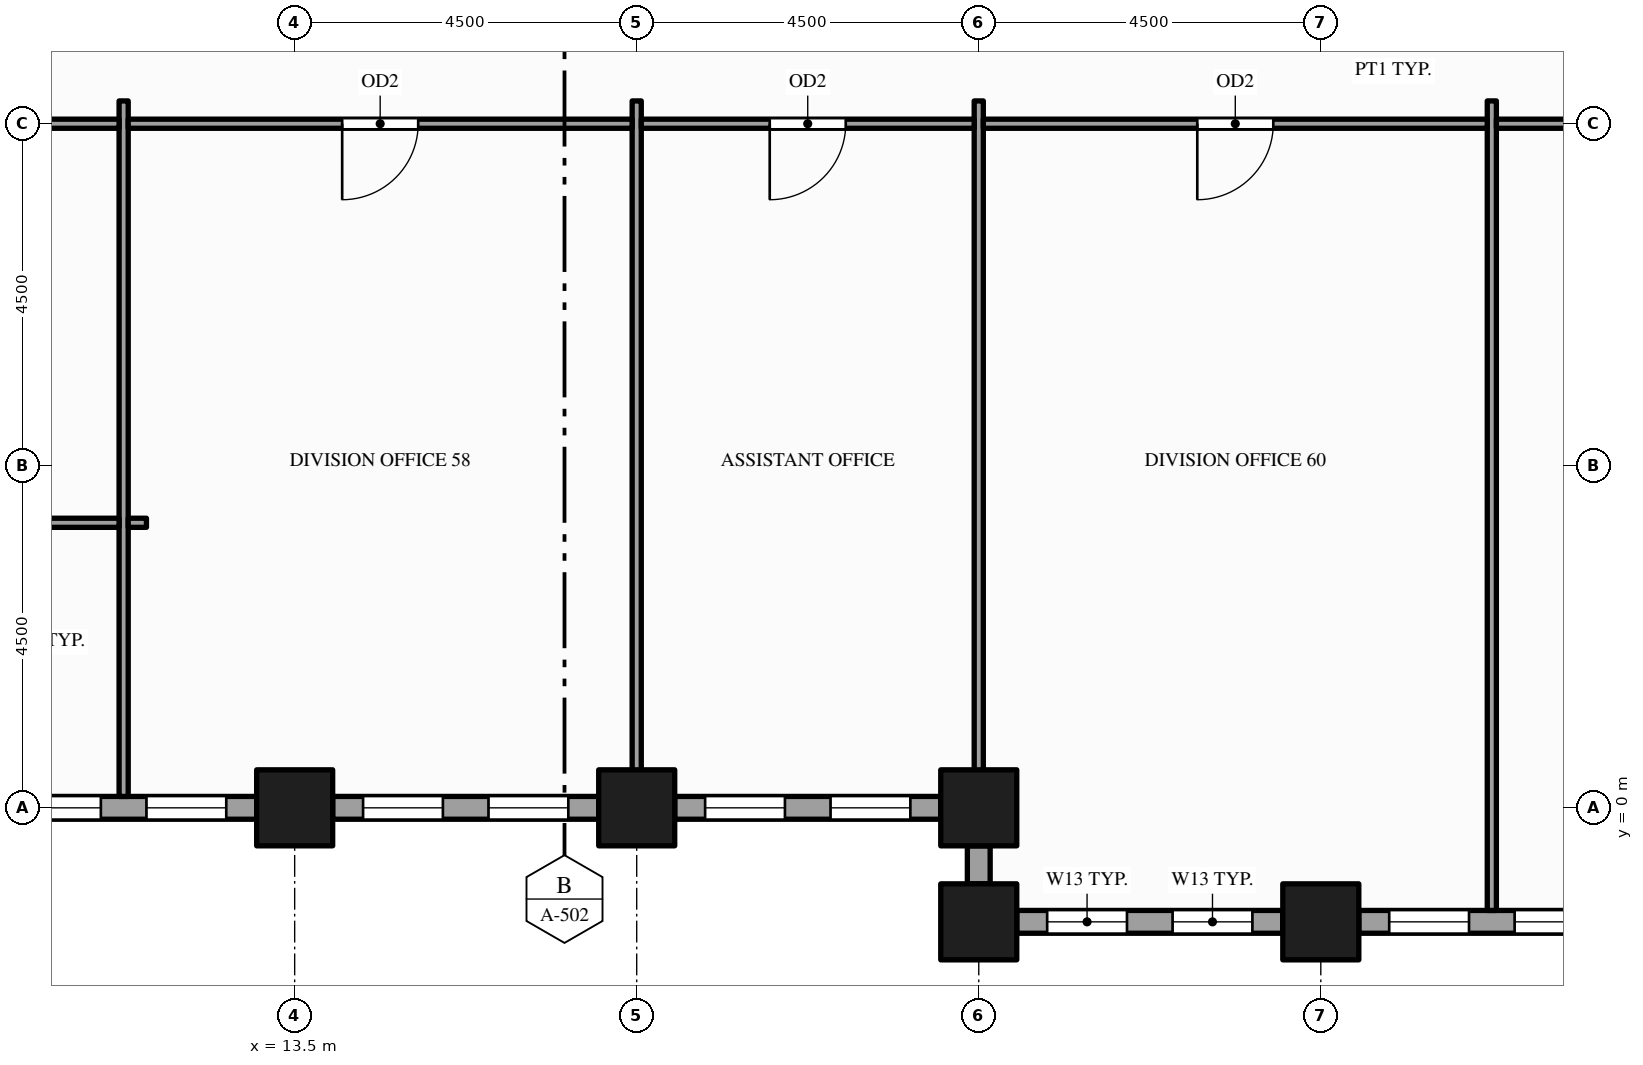
"""IFC4 building model, lengths in metres.
Left out: names, types, materials, properties, quantities, classifications, styles, units other than length and angle.
Written with IfcOpenShell. Run it as: python <this file> out.ifc"""

import sys

from ifc_helpers import new_model, si_unit, direction, frame, frame_2d, origin, origin_2d, place, context, subcontext, project, spatial, rectangle, hollow_rectangle, extrude, element, fill, save


model = new_model("IFC4")
c1 = context("Model", 3, precision=1e-05, world=origin(), true_north=direction((0.0, 1.0)))
c2 = subcontext(c1, "Body", "Model", "MODEL_VIEW")
j1 = project(units=[si_unit("LENGTHUNIT", "METRE"), si_unit("PLANEANGLEUNIT", "RADIAN")], contexts=[c1])
p1 = place(None, origin())
s1 = spatial("IfcSite", under=j1, at=p1, CompositionType="ELEMENT")
p2 = place(p1, origin())
s2 = spatial("IfcBuilding", under=s1, at=p2, CompositionType="ELEMENT")
p3 = place(p2, frame((0.0, 0.0, 95.0)))
s3 = spatial("IfcBuildingStorey", under=s2, at=p3, CompositionType="ELEMENT", Elevation=95.0)
for number, where, z_axis, x_axis in (
    (1, (13.5, 0.0, -0.15), (0.0, 0.0, 1.0), (1.0, 0.0, 0.0)),
    (2, (18.0, 0.0, -0.15), (0.0, 0.0, 1.0), (1.0, 0.0, 0.0)),
    (3, (22.5, -1.5, -0.15), (0.0, 0.0, 1.0), (1.0, 0.0, 0.0)),
    (4, (22.5, 0.0, -0.15), (0.0, 0.0, 1.0), (1.0, 0.0, 0.0)),
    (5, (27.0, -1.5, -0.15), (0.0, 0.0, 1.0), (1.0, 0.0, 0.0)),
):
    element("IfcColumn", number, at=place(p3, frame(where, z_axis=z_axis, x_axis=x_axis)), inside=s3, PredefinedType="COLUMN", context=c2, shape_type="SweptSolid", body=[
        extrude(hollow_rectangle(XDim=1.0, YDim=1.0, WallThickness=0.05, at=origin_2d()), origin(), (0.0, 0.0, 1.0), 4.0),
    ])
p4 = place(p3, frame((23.0, -1.5, 0.0), z_axis=(0.0, 0.0, 1.0), x_axis=(1.0, 0.0, 0.0)))
e6 = element("IfcWall", 6, at=p4, inside=s3, PredefinedType="STANDARD", context=c2, shape_type="SweptSolid", body=[
    extrude(rectangle(XDim=3.5, YDim=0.3, at=frame_2d((1.75, 0.0))), origin(), (0.0, 0.0, 1.0), 3.154),
])
p5 = place(p4, frame((0.4, 0.0, 0.9)))
e7 = element("IfcOpeningElement", 7, at=p5, cuts=e6, PredefinedType="OPENING", context=c2, shape_type="SweptSolid", body=[
    extrude(rectangle(XDim=1.05, YDim=2.0, at=frame_2d((0.525, 1.0))), frame((0.0, 0.16, 0.0), z_axis=(0.0, -1.0, 0.0), x_axis=(1.0, 0.0, 0.0)), (0.0, 0.0, 1.0), 0.32),
])
p6 = place(p4, frame((2.05, 0.0, 0.9)))
e8 = element("IfcOpeningElement", 8, at=p6, cuts=e6, PredefinedType="OPENING", context=c2, shape_type="SweptSolid", body=[
    extrude(rectangle(XDim=1.05, YDim=2.0, at=frame_2d((0.525, 1.0))), frame((0.0, 0.16, 0.0), z_axis=(0.0, -1.0, 0.0), x_axis=(1.0, 0.0, 0.0)), (0.0, 0.0, 1.0), 0.32),
])
p7 = place(p3, frame((27.5, -1.5, 0.0), z_axis=(0.0, 0.0, 1.0), x_axis=(1.0, 0.0, 0.0)))
e9 = element("IfcWall", 9, at=p7, inside=s3, PredefinedType="STANDARD", context=c2, shape_type="SweptSolid", body=[
    extrude(rectangle(XDim=3.5, YDim=0.3, at=frame_2d((1.75, 0.0))), origin(), (0.0, 0.0, 1.0), 3.154),
])
p8 = place(p7, frame((0.4, 0.0, 0.9)))
e10 = element("IfcOpeningElement", 10, at=p8, cuts=e9, PredefinedType="OPENING", context=c2, shape_type="SweptSolid", body=[
    extrude(rectangle(XDim=1.05, YDim=2.0, at=frame_2d((0.525, 1.0))), frame((0.0, 0.16, 0.0), z_axis=(0.0, -1.0, 0.0), x_axis=(1.0, 0.0, 0.0)), (0.0, 0.0, 1.0), 0.32),
])
p9 = place(p7, frame((2.05, 0.0, 0.9)))
e11 = element("IfcOpeningElement", 11, at=p9, cuts=e9, PredefinedType="OPENING", context=c2, shape_type="SweptSolid", body=[
    extrude(rectangle(XDim=1.05, YDim=2.0, at=frame_2d((0.525, 1.0))), frame((0.0, 0.16, 0.0), z_axis=(0.0, -1.0, 0.0), x_axis=(1.0, 0.0, 0.0)), (0.0, 0.0, 1.0), 0.32),
])
p10 = place(p3, frame((9.5, 0.0, 0.0), z_axis=(0.0, 0.0, 1.0), x_axis=(1.0, 0.0, 0.0)))
e12 = element("IfcWall", 12, at=p10, inside=s3, PredefinedType="STANDARD", context=c2, shape_type="SweptSolid", body=[
    extrude(rectangle(XDim=3.5, YDim=0.3, at=frame_2d((1.75, 0.0))), origin(), (0.0, 0.0, 1.0), 3.154),
])
p11 = place(p10, frame((0.4, 0.0, 0.9)))
e13 = element("IfcOpeningElement", 13, at=p11, cuts=e12, PredefinedType="OPENING", context=c2, shape_type="SweptSolid", body=[
    extrude(rectangle(XDim=1.05, YDim=2.0, at=frame_2d((0.525, 1.0))), frame((0.0, 0.16, 0.0), z_axis=(0.0, -1.0, 0.0), x_axis=(1.0, 0.0, 0.0)), (0.0, 0.0, 1.0), 0.32),
])
p12 = place(p10, frame((2.05, 0.0, 0.9)))
e14 = element("IfcOpeningElement", 14, at=p12, cuts=e12, PredefinedType="OPENING", context=c2, shape_type="SweptSolid", body=[
    extrude(rectangle(XDim=1.05, YDim=2.0, at=frame_2d((0.525, 1.0))), frame((0.0, 0.16, 0.0), z_axis=(0.0, -1.0, 0.0), x_axis=(1.0, 0.0, 0.0)), (0.0, 0.0, 1.0), 0.32),
])
p13 = place(p3, frame((14.0, 0.0, 0.0), z_axis=(0.0, 0.0, 1.0), x_axis=(1.0, 0.0, 0.0)))
e15 = element("IfcWall", 15, at=p13, inside=s3, PredefinedType="STANDARD", context=c2, shape_type="SweptSolid", body=[
    extrude(rectangle(XDim=3.5, YDim=0.3, at=frame_2d((1.75, 0.0))), origin(), (0.0, 0.0, 1.0), 3.154),
])
p14 = place(p13, frame((0.4, 0.0, 0.9)))
e16 = element("IfcOpeningElement", 16, at=p14, cuts=e15, PredefinedType="OPENING", context=c2, shape_type="SweptSolid", body=[
    extrude(rectangle(XDim=1.05, YDim=2.0, at=frame_2d((0.525, 1.0))), frame((0.0, 0.16, 0.0), z_axis=(0.0, -1.0, 0.0), x_axis=(1.0, 0.0, 0.0)), (0.0, 0.0, 1.0), 0.32),
])
p15 = place(p13, frame((2.05, 0.0, 0.9)))
e17 = element("IfcOpeningElement", 17, at=p15, cuts=e15, PredefinedType="OPENING", context=c2, shape_type="SweptSolid", body=[
    extrude(rectangle(XDim=1.05, YDim=2.0, at=frame_2d((0.525, 1.0))), frame((0.0, 0.16, 0.0), z_axis=(0.0, -1.0, 0.0), x_axis=(1.0, 0.0, 0.0)), (0.0, 0.0, 1.0), 0.32),
])
p16 = place(p3, frame((18.5, 0.0, 0.0), z_axis=(0.0, 0.0, 1.0), x_axis=(1.0, 0.0, 0.0)))
e18 = element("IfcWall", 18, at=p16, inside=s3, PredefinedType="STANDARD", context=c2, shape_type="SweptSolid", body=[
    extrude(rectangle(XDim=3.5, YDim=0.3, at=frame_2d((1.75, 0.0))), origin(), (0.0, 0.0, 1.0), 3.154),
])
p17 = place(p16, frame((0.4, 0.0, 0.9)))
e19 = element("IfcOpeningElement", 19, at=p17, cuts=e18, PredefinedType="OPENING", context=c2, shape_type="SweptSolid", body=[
    extrude(rectangle(XDim=1.05, YDim=2.0, at=frame_2d((0.525, 1.0))), frame((0.0, 0.16, 0.0), z_axis=(0.0, -1.0, 0.0), x_axis=(1.0, 0.0, 0.0)), (0.0, 0.0, 1.0), 0.32),
])
p18 = place(p16, frame((2.05, 0.0, 0.9)))
e20 = element("IfcOpeningElement", 20, at=p18, cuts=e18, PredefinedType="OPENING", context=c2, shape_type="SweptSolid", body=[
    extrude(rectangle(XDim=1.05, YDim=2.0, at=frame_2d((0.525, 1.0))), frame((0.0, 0.16, 0.0), z_axis=(0.0, -1.0, 0.0), x_axis=(1.0, 0.0, 0.0)), (0.0, 0.0, 1.0), 0.32),
])
p19 = place(p3, frame((22.5, -0.5, 0.0), z_axis=(0.0, 0.0, 1.0), x_axis=(0.0, -1.0, 0.0)))
e21 = element("IfcWall", 21, at=p19, inside=s3, PredefinedType="STANDARD", context=c2, shape_type="SweptSolid", body=[
    extrude(rectangle(XDim=0.5, YDim=0.3, at=frame_2d((0.25, 0.0))), origin(), (0.0, 0.0, 1.0), 3.154),
])
for number, where, z_axis, x_axis in (
    (22, (11.25, 0.15, 0.0), (0.0, 0.0, 1.0), (0.0, 1.0, 0.0)),
    (23, (18.0, 0.15, 0.0), (0.0, 0.0, 1.0), (0.0, 1.0, 0.0)),
    (24, (22.5, 0.15, 0.0), (0.0, 0.0, 1.0), (0.0, 1.0, 0.0)),
):
    element("IfcWall", number, at=place(p3, frame(where, z_axis=z_axis, x_axis=x_axis)), inside=s3, PredefinedType="PARTITIONING", context=c2, shape_type="SweptSolid", body=[
        extrude(rectangle(XDim=9.15, YDim=0.12, at=frame_2d((4.575, 0.0))), origin(), (0.0, 0.0, 1.0), 2.938),
    ])
p20 = place(p3, frame((29.25, -1.35, 0.0), z_axis=(0.0, 0.0, 1.0), x_axis=(0.0, 1.0, 0.0)))
e25 = element("IfcWall", 25, at=p20, inside=s3, PredefinedType="PARTITIONING", context=c2, shape_type="SweptSolid", body=[
    extrude(rectangle(XDim=10.65, YDim=0.12, at=frame_2d((5.325, 0.0))), origin(), (0.0, 0.0, 1.0), 2.938),
])
p21 = place(p3, frame((9.125, 3.75, 0.0), z_axis=(0.0, 0.0, 1.0), x_axis=(1.0, 0.0, 0.0)))
e26 = element("IfcWall", 26, at=p21, inside=s3, PredefinedType="PARTITIONING", context=c2, shape_type="SweptSolid", body=[
    extrude(rectangle(XDim=2.065, YDim=0.12, at=frame_2d((1.032, 0.0))), origin(), (0.0, 0.0, 1.0), 2.938),
])
p22 = place(p3, frame((11.31, 3.75, 0.0), z_axis=(0.0, 0.0, 1.0), x_axis=(1.0, 0.0, 0.0)))
e27 = element("IfcWall", 27, at=p22, inside=s3, PredefinedType="PARTITIONING", context=c2, shape_type="SweptSolid", body=[
    extrude(rectangle(XDim=0.24, YDim=0.12, at=frame_2d((0.12, 0.0))), origin(), (0.0, 0.0, 1.0), 2.938),
])
p23 = place(p3, frame((0.15, 9.0, 0.0), z_axis=(0.0, 0.0, 1.0), x_axis=(1.0, 0.0, 0.0)))
e28 = element("IfcWall", 28, at=p23, inside=s3, PredefinedType="PARTITIONING", context=c2, shape_type="SweptSolid", body=[
    extrude(rectangle(XDim=11.04, YDim=0.12, at=frame_2d((5.52, 0.0))), origin(), (0.0, 0.0, 1.0), 2.938),
])
p24 = place(p23, frame((4.93, 0.0, 0.0)))
e29 = element("IfcOpeningElement", 29, at=p24, cuts=e28, PredefinedType="OPENING", context=c2, shape_type="SweptSolid", body=[
    extrude(rectangle(XDim=1.2, YDim=2.1, at=frame_2d((0.6, 1.05))), frame((0.0, 0.07, 0.0), z_axis=(0.0, -1.0, 0.0), x_axis=(1.0, 0.0, 0.0)), (0.0, 0.0, 1.0), 0.14),
])
p25 = place(p3, frame((11.31, 9.0, 0.0), z_axis=(0.0, 0.0, 1.0), x_axis=(1.0, 0.0, 0.0)))
e30 = element("IfcWall", 30, at=p25, inside=s3, PredefinedType="PARTITIONING", context=c2, shape_type="SweptSolid", body=[
    extrude(rectangle(XDim=6.63, YDim=0.12, at=frame_2d((3.315, 0.0))), origin(), (0.0, 0.0, 1.0), 2.938),
])
p26 = place(p25, frame((2.815, 0.0, 0.0)))
e31 = element("IfcOpeningElement", 31, at=p26, cuts=e30, PredefinedType="OPENING", context=c2, shape_type="SweptSolid", body=[
    extrude(rectangle(XDim=1.0, YDim=2.1, at=frame_2d((0.5, 1.05))), frame((0.0, 0.07, 0.0), z_axis=(0.0, -1.0, 0.0), x_axis=(1.0, 0.0, 0.0)), (0.0, 0.0, 1.0), 0.14),
])
p27 = place(p3, frame((18.06, 9.0, 0.0), z_axis=(0.0, 0.0, 1.0), x_axis=(1.0, 0.0, 0.0)))
e32 = element("IfcWall", 32, at=p27, inside=s3, PredefinedType="PARTITIONING", context=c2, shape_type="SweptSolid", body=[
    extrude(rectangle(XDim=4.38, YDim=0.12, at=frame_2d((2.19, 0.0))), origin(), (0.0, 0.0, 1.0), 2.938),
])
p28 = place(p27, frame((1.69, 0.0, 0.0)))
e33 = element("IfcOpeningElement", 33, at=p28, cuts=e32, PredefinedType="OPENING", context=c2, shape_type="SweptSolid", body=[
    extrude(rectangle(XDim=1.0, YDim=2.1, at=frame_2d((0.5, 1.05))), frame((0.0, 0.07, 0.0), z_axis=(0.0, -1.0, 0.0), x_axis=(1.0, 0.0, 0.0)), (0.0, 0.0, 1.0), 0.14),
])
p29 = place(p3, frame((22.56, 9.0, 0.0), z_axis=(0.0, 0.0, 1.0), x_axis=(1.0, 0.0, 0.0)))
e34 = element("IfcWall", 34, at=p29, inside=s3, PredefinedType="PARTITIONING", context=c2, shape_type="SweptSolid", body=[
    extrude(rectangle(XDim=6.63, YDim=0.12, at=frame_2d((3.315, 0.0))), origin(), (0.0, 0.0, 1.0), 2.76),
])
p30 = place(p29, frame((2.815, 0.0, 0.0)))
e35 = element("IfcOpeningElement", 35, at=p30, cuts=e34, PredefinedType="OPENING", context=c2, shape_type="SweptSolid", body=[
    extrude(rectangle(XDim=1.0, YDim=2.1, at=frame_2d((0.5, 1.05))), frame((0.0, 0.07, 0.0), z_axis=(0.0, -1.0, 0.0), x_axis=(1.0, 0.0, 0.0)), (0.0, 0.0, 1.0), 0.14),
])
p31 = place(p3, frame((29.31, 9.0, 0.0), z_axis=(0.0, 0.0, 1.0), x_axis=(1.0, 0.0, 0.0)))
e36 = element("IfcWall", 36, at=p31, inside=s3, PredefinedType="PARTITIONING", context=c2, shape_type="SweptSolid", body=[
    extrude(rectangle(XDim=4.38, YDim=0.12, at=frame_2d((2.19, 0.0))), origin(), (0.0, 0.0, 1.0), 2.938),
])
p32 = place(p31, frame((1.69, 0.0, 0.0)))
e37 = element("IfcOpeningElement", 37, at=p32, cuts=e36, PredefinedType="OPENING", context=c2, shape_type="SweptSolid", body=[
    extrude(rectangle(XDim=1.0, YDim=2.1, at=frame_2d((0.5, 1.05))), frame((0.0, 0.07, 0.0), z_axis=(0.0, -1.0, 0.0), x_axis=(1.0, 0.0, 0.0)), (0.0, 0.0, 1.0), 0.14),
])
p33 = place(p5, origin())
e38 = element("IfcWindow", 38, at=p33, inside=s3, PartitioningType="SINGLE_PANEL", PredefinedType="WINDOW", context=c2, shape_type="SweptSolid", body=[
    extrude(rectangle(XDim=1.05, YDim=2.0, at=frame_2d((0.525, 1.0))), frame((0.0, 0.03, 0.0), z_axis=(0.0, -1.0, 0.0), x_axis=(1.0, 0.0, 0.0)), (0.0, 0.0, 1.0), 0.06),
])
fill(e7, e38)
p34 = place(p6, origin())
e39 = element("IfcWindow", 39, at=p34, inside=s3, PartitioningType="SINGLE_PANEL", PredefinedType="WINDOW", context=c2, shape_type="SweptSolid", body=[
    extrude(rectangle(XDim=1.05, YDim=2.0, at=frame_2d((0.525, 1.0))), frame((0.0, 0.03, 0.0), z_axis=(0.0, -1.0, 0.0), x_axis=(1.0, 0.0, 0.0)), (0.0, 0.0, 1.0), 0.06),
])
fill(e8, e39)
p35 = place(p8, origin())
e40 = element("IfcWindow", 40, at=p35, inside=s3, PartitioningType="SINGLE_PANEL", PredefinedType="WINDOW", context=c2, shape_type="SweptSolid", body=[
    extrude(rectangle(XDim=1.05, YDim=2.0, at=frame_2d((0.525, 1.0))), frame((0.0, 0.03, 0.0), z_axis=(0.0, -1.0, 0.0), x_axis=(1.0, 0.0, 0.0)), (0.0, 0.0, 1.0), 0.06),
])
fill(e10, e40)
p36 = place(p9, origin())
e41 = element("IfcWindow", 41, at=p36, inside=s3, PartitioningType="SINGLE_PANEL", PredefinedType="WINDOW", context=c2, shape_type="SweptSolid", body=[
    extrude(rectangle(XDim=1.05, YDim=2.0, at=frame_2d((0.525, 1.0))), frame((0.0, 0.03, 0.0), z_axis=(0.0, -1.0, 0.0), x_axis=(1.0, 0.0, 0.0)), (0.0, 0.0, 1.0), 0.06),
])
fill(e11, e41)
p37 = place(p11, origin())
e42 = element("IfcWindow", 42, at=p37, inside=s3, PartitioningType="SINGLE_PANEL", PredefinedType="WINDOW", context=c2, shape_type="SweptSolid", body=[
    extrude(rectangle(XDim=1.05, YDim=2.0, at=frame_2d((0.525, 1.0))), frame((0.0, 0.03, 0.0), z_axis=(0.0, -1.0, 0.0), x_axis=(1.0, 0.0, 0.0)), (0.0, 0.0, 1.0), 0.06),
])
fill(e13, e42)
p38 = place(p12, origin())
e43 = element("IfcWindow", 43, at=p38, inside=s3, PartitioningType="SINGLE_PANEL", PredefinedType="WINDOW", context=c2, shape_type="SweptSolid", body=[
    extrude(rectangle(XDim=1.05, YDim=2.0, at=frame_2d((0.525, 1.0))), frame((0.0, 0.03, 0.0), z_axis=(0.0, -1.0, 0.0), x_axis=(1.0, 0.0, 0.0)), (0.0, 0.0, 1.0), 0.06),
])
fill(e14, e43)
p39 = place(p14, origin())
e44 = element("IfcWindow", 44, at=p39, inside=s3, PartitioningType="SINGLE_PANEL", PredefinedType="WINDOW", context=c2, shape_type="SweptSolid", body=[
    extrude(rectangle(XDim=1.05, YDim=2.0, at=frame_2d((0.525, 1.0))), frame((0.0, 0.03, 0.0), z_axis=(0.0, -1.0, 0.0), x_axis=(1.0, 0.0, 0.0)), (0.0, 0.0, 1.0), 0.06),
])
fill(e16, e44)
p40 = place(p15, origin())
e45 = element("IfcWindow", 45, at=p40, inside=s3, PartitioningType="SINGLE_PANEL", PredefinedType="WINDOW", context=c2, shape_type="SweptSolid", body=[
    extrude(rectangle(XDim=1.05, YDim=2.0, at=frame_2d((0.525, 1.0))), frame((0.0, 0.03, 0.0), z_axis=(0.0, -1.0, 0.0), x_axis=(1.0, 0.0, 0.0)), (0.0, 0.0, 1.0), 0.06),
])
fill(e17, e45)
p41 = place(p17, origin())
e46 = element("IfcWindow", 46, at=p41, inside=s3, PartitioningType="SINGLE_PANEL", PredefinedType="WINDOW", context=c2, shape_type="SweptSolid", body=[
    extrude(rectangle(XDim=1.05, YDim=2.0, at=frame_2d((0.525, 1.0))), frame((0.0, 0.03, 0.0), z_axis=(0.0, -1.0, 0.0), x_axis=(1.0, 0.0, 0.0)), (0.0, 0.0, 1.0), 0.06),
])
fill(e19, e46)
p42 = place(p18, origin())
e47 = element("IfcWindow", 47, at=p42, inside=s3, PartitioningType="SINGLE_PANEL", PredefinedType="WINDOW", context=c2, shape_type="SweptSolid", body=[
    extrude(rectangle(XDim=1.05, YDim=2.0, at=frame_2d((0.525, 1.0))), frame((0.0, 0.03, 0.0), z_axis=(0.0, -1.0, 0.0), x_axis=(1.0, 0.0, 0.0)), (0.0, 0.0, 1.0), 0.06),
])
fill(e20, e47)
p43 = place(p26, origin())
e48 = element("IfcDoor", 48, at=p43, inside=s3, OperationType="SINGLE_SWING_LEFT", PredefinedType="DOOR", context=c2, shape_type="SweptSolid", body=[
    extrude(rectangle(XDim=1.0, YDim=2.1, at=frame_2d((0.5, 1.05))), frame((0.0, 0.025, 0.0), z_axis=(0.0, -1.0, 0.0), x_axis=(1.0, 0.0, 0.0)), (0.0, 0.0, 1.0), 0.05),
])
fill(e31, e48)
p44 = place(p28, origin())
e49 = element("IfcDoor", 49, at=p44, inside=s3, OperationType="SINGLE_SWING_LEFT", PredefinedType="DOOR", context=c2, shape_type="SweptSolid", body=[
    extrude(rectangle(XDim=1.0, YDim=2.1, at=frame_2d((0.5, 1.05))), frame((0.0, 0.025, 0.0), z_axis=(0.0, -1.0, 0.0), x_axis=(1.0, 0.0, 0.0)), (0.0, 0.0, 1.0), 0.05),
])
fill(e33, e49)
p45 = place(p30, origin())
e50 = element("IfcDoor", 50, at=p45, inside=s3, OperationType="SINGLE_SWING_LEFT", PredefinedType="DOOR", context=c2, shape_type="SweptSolid", body=[
    extrude(rectangle(XDim=1.0, YDim=2.1, at=frame_2d((0.5, 1.05))), frame((0.0, 0.025, 0.0), z_axis=(0.0, -1.0, 0.0), x_axis=(1.0, 0.0, 0.0)), (0.0, 0.0, 1.0), 0.05),
])
fill(e35, e50)
save(model, sys.argv[1])
